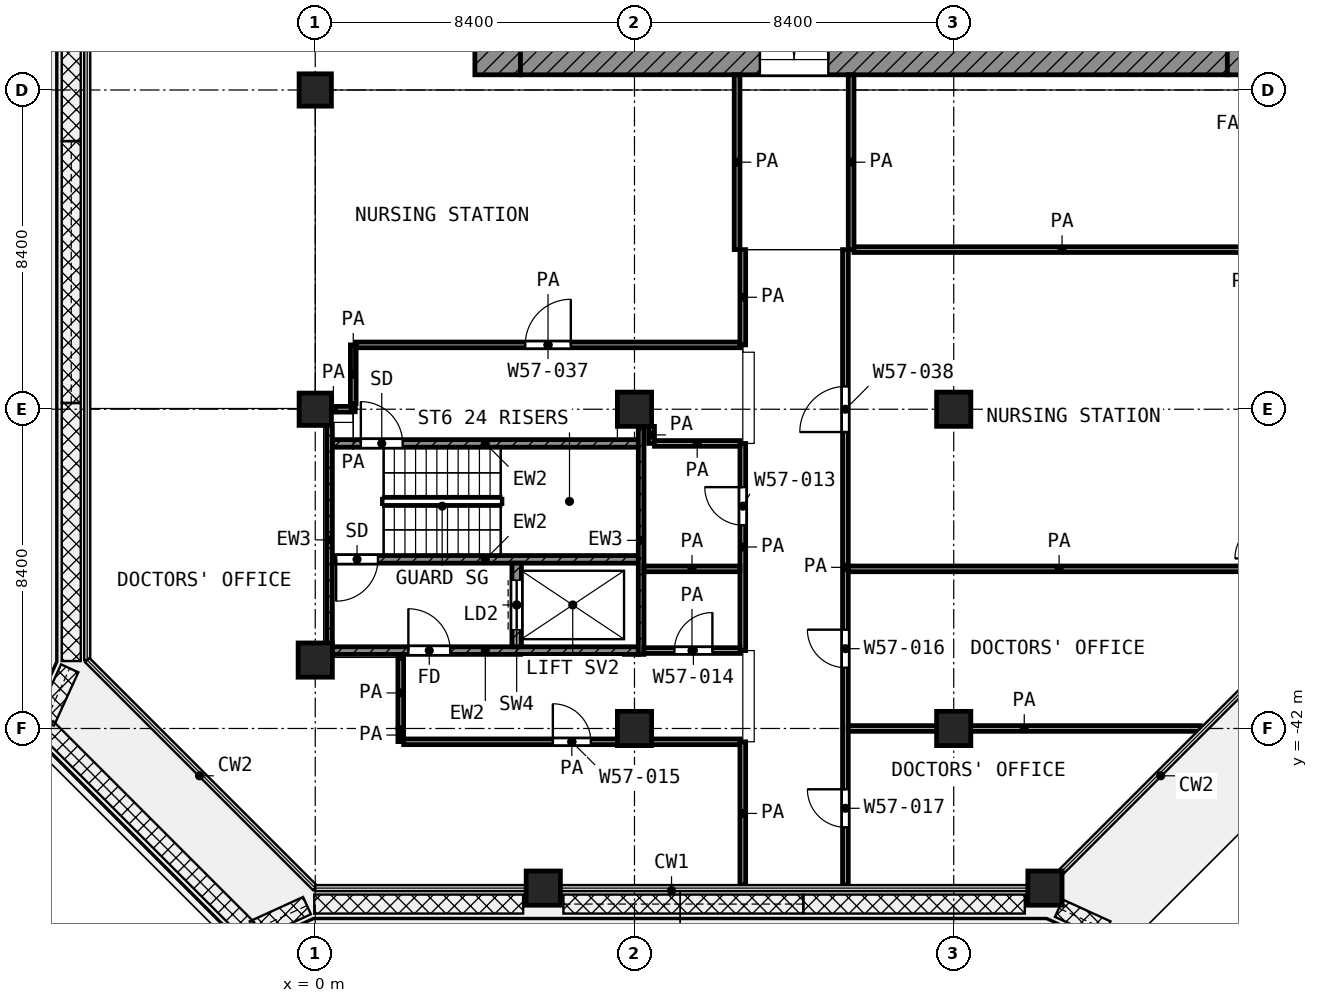
"""IFC4 building model, lengths in metres.
Left out: names, types, materials, properties, quantities, classifications, styles, units other than length and angle.
Written with IfcOpenShell. Run it as: python <this file> out.ifc"""

import sys

from ifc_helpers import new_model, si_unit, direction, frame, frame_2d, origin, origin_2d, place, context, subcontext, project, spatial, rectangle, extrude, element, fill, save


model = new_model("IFC4")
c1 = context("Model", 3, precision=1e-05, world=origin(), true_north=direction((0.0, 1.0)))
c2 = subcontext(c1, "Body", "Model", "MODEL_VIEW")
j1 = project(units=[si_unit("LENGTHUNIT", "METRE"), si_unit("PLANEANGLEUNIT", "RADIAN")], contexts=[c1])
p1 = place(None, origin())
s1 = spatial("IfcSite", under=j1, at=p1, CompositionType="ELEMENT")
p2 = place(p1, origin())
s2 = spatial("IfcBuilding", under=s1, at=p2, CompositionType="ELEMENT")
p3 = place(p2, frame((0.0, 0.0, 268.4)))
s3 = spatial("IfcBuildingStorey", under=s2, at=p3, CompositionType="ELEMENT", Elevation=268.4)
for number, where, z_axis, x_axis in (
    (1, (0.0, -25.2, 0.0), (0.0, 0.0, 1.0), (1.0, 0.0, 0.0)),
    (2, (0.0, -33.6, 0.0), (0.0, 0.0, 1.0), (1.0, 0.0, 0.0)),
):
    element("IfcColumn", number, at=place(p3, frame(where, z_axis=z_axis, x_axis=x_axis)), inside=s3, PredefinedType="COLUMN", context=c2, shape_type="SweptSolid", body=[
        extrude(rectangle(XDim=0.85, YDim=0.85, at=origin_2d()), origin(), (0.0, 0.0, 1.0), 4.2),
    ])
for number, where, z_axis, x_axis in (
    (3, (8.4, -33.6, 0.0), (0.0, 0.0, 1.0), (1.0, 0.0, 0.0)),
    (4, (16.8, -33.6, 0.0), (0.0, 0.0, 1.0), (1.0, 0.0, 0.0)),
    (5, (0.0, -40.2, 0.0), (0.0, 0.0, 1.0), (1.0, 0.0, 0.0)),
    (6, (8.4, -42.0, 0.0), (0.0, 0.0, 1.0), (1.0, 0.0, 0.0)),
    (7, (16.8, -42.0, 0.0), (0.0, 0.0, 1.0), (1.0, 0.0, 0.0)),
    (8, (6.0, -46.2, 0.0), (0.0, 0.0, 1.0), (1.0, 0.0, 0.0)),
    (9, (19.2, -46.2, 0.0), (0.0, 0.0, 1.0), (1.0, 0.0, 0.0)),
):
    element("IfcColumn", number, at=place(p3, frame(where, z_axis=z_axis, x_axis=x_axis)), inside=s3, PredefinedType="COLUMN", context=c2, shape_type="SweptSolid", body=[
        extrude(rectangle(XDim=0.9, YDim=0.9, at=origin_2d()), origin(), (0.0, 0.0, 1.0), 4.2),
    ])
p4 = place(p3, frame((4.8, -24.8, 0.0), z_axis=(0.0, 0.0, 1.0), x_axis=(0.0, 1.0, 0.0)))
e10 = element("IfcWall", 10, at=p4, inside=s3, PredefinedType="SHEAR", context=c2, shape_type="SweptSolid", body=[
    extrude(rectangle(XDim=19.4, YDim=1.2, at=frame_2d((9.7, 0.0))), origin(), (0.0, 0.0, 1.0), 3.7),
])
p5 = place(p4, frame((11.25, 0.0, 0.0)))
e11 = element("IfcOpeningElement", 11, at=p5, cuts=e10, PredefinedType="OPENING", context=c2, shape_type="SweptSolid", body=[
    extrude(rectangle(XDim=1.1, YDim=2.1, at=frame_2d((0.55, 1.05))), frame((0.0, 0.61, 0.0), z_axis=(0.0, -1.0, 0.0), x_axis=(1.0, 0.0, 0.0)), (0.0, 0.0, 1.0), 1.22),
])
p6 = place(p4, frame((1.95, 0.0, 0.0)))
e12 = element("IfcOpeningElement", 12, at=p6, cuts=e10, PredefinedType="OPENING", context=c2, shape_type="SweptSolid", body=[
    extrude(rectangle(XDim=1.1, YDim=2.1, at=frame_2d((0.55, 1.05))), frame((0.0, 0.61, 0.0), z_axis=(0.0, -1.0, 0.0), x_axis=(1.0, 0.0, 0.0)), (0.0, 0.0, 1.0), 1.22),
])
p7 = place(p3, frame((5.4, -24.4, 0.0), z_axis=(0.0, 0.0, 1.0), x_axis=(1.0, 0.0, 0.0)))
e13 = element("IfcWall", 13, at=p7, inside=s3, PredefinedType="SHEAR", context=c2, shape_type="SweptSolid", body=[
    extrude(rectangle(XDim=18.6, YDim=0.8, at=frame_2d((9.3, 0.0))), origin(), (0.0, 0.0, 1.0), 3.7),
])
p8 = place(p7, frame((6.3, 0.0, 0.0)))
e14 = element("IfcOpeningElement", 14, at=p8, cuts=e13, PredefinedType="OPENING", context=c2, shape_type="SweptSolid", body=[
    extrude(rectangle(XDim=1.8, YDim=2.1, at=frame_2d((0.9, 1.05))), frame((0.0, 0.41, 0.0), z_axis=(0.0, -1.0, 0.0), x_axis=(1.0, 0.0, 0.0)), (0.0, 0.0, 1.0), 0.82),
])
p9 = place(p3, frame((24.4, -24.8, 0.0), z_axis=(0.0, 0.0, 1.0), x_axis=(0.0, 1.0, 0.0)))
e15 = element("IfcWall", 15, at=p9, inside=s3, PredefinedType="SHEAR", context=c2, shape_type="SweptSolid", body=[
    extrude(rectangle(XDim=0.8, YDim=0.8, at=frame_2d((0.4, 0.0))), origin(), (0.0, 0.0, 1.0), 3.7),
])
p10 = place(p3, frame((0.375, -40.05, 0.0), z_axis=(0.0, 0.0, 1.0), x_axis=(0.0, 1.0, 0.0)))
e16 = element("IfcWall", 16, at=p10, inside=s3, PredefinedType="SHEAR", context=c2, shape_type="SweptSolid", body=[
    extrude(rectangle(XDim=6.025, YDim=0.15, at=frame_2d((3.013, 0.0))), origin(), (0.0, 0.0, 1.0), 3.7),
])
p11 = place(p3, frame((8.575, -40.05, 0.0), z_axis=(0.0, 0.0, 1.0), x_axis=(0.0, 1.0, 0.0)))
e17 = element("IfcWall", 17, at=p11, inside=s3, PredefinedType="SHEAR", context=c2, shape_type="SweptSolid", body=[
    extrude(rectangle(XDim=6.0, YDim=0.15, at=frame_2d((3.0, 0.0))), origin(), (0.0, 0.0, 1.0), 3.7),
])
p12 = place(p3, frame((0.45, -34.5, 0.0), z_axis=(0.0, 0.0, 1.0), x_axis=(1.0, 0.0, 0.0)))
e18 = element("IfcWall", 18, at=p12, inside=s3, PredefinedType="SHEAR", context=c2, shape_type="SweptSolid", body=[
    extrude(rectangle(XDim=8.05, YDim=0.2, at=frame_2d((4.025, 0.0))), origin(), (0.0, 0.0, 1.0), 3.7),
])
p13 = place(p12, frame((0.75, 0.0, 0.0)))
e19 = element("IfcOpeningElement", 19, at=p13, cuts=e18, PredefinedType="OPENING", context=c2, shape_type="SweptSolid", body=[
    extrude(rectangle(XDim=1.1, YDim=2.1, at=frame_2d((0.55, 1.05))), frame((0.0, 0.11, 0.0), z_axis=(0.0, -1.0, 0.0), x_axis=(1.0, 0.0, 0.0)), (0.0, 0.0, 1.0), 0.22),
])
p14 = place(p3, frame((0.45, -37.55, 0.0), z_axis=(0.0, 0.0, 1.0), x_axis=(1.0, 0.0, 0.0)))
e20 = element("IfcWall", 20, at=p14, inside=s3, PredefinedType="SHEAR", context=c2, shape_type="SweptSolid", body=[
    extrude(rectangle(XDim=8.05, YDim=0.2, at=frame_2d((4.025, 0.0))), origin(), (0.0, 0.0, 1.0), 3.7),
])
p15 = place(p14, frame((0.1, 0.0, 0.0)))
e21 = element("IfcOpeningElement", 21, at=p15, cuts=e20, PredefinedType="OPENING", context=c2, shape_type="SweptSolid", body=[
    extrude(rectangle(XDim=1.1, YDim=2.1, at=frame_2d((0.55, 1.05))), frame((0.0, 0.11, 0.0), z_axis=(0.0, -1.0, 0.0), x_axis=(1.0, 0.0, 0.0)), (0.0, 0.0, 1.0), 0.22),
])
p16 = place(p3, frame((0.45, -39.95, 0.0), z_axis=(0.0, 0.0, 1.0), x_axis=(1.0, 0.0, 0.0)))
e22 = element("IfcWall", 22, at=p16, inside=s3, PredefinedType="SHEAR", context=c2, shape_type="SweptSolid", body=[
    extrude(rectangle(XDim=8.05, YDim=0.2, at=frame_2d((4.025, 0.0))), origin(), (0.0, 0.0, 1.0), 3.7),
])
p17 = place(p16, frame((2.0, 0.0, 0.0)))
e23 = element("IfcOpeningElement", 23, at=p17, cuts=e22, PredefinedType="OPENING", context=c2, shape_type="SweptSolid", body=[
    extrude(rectangle(XDim=1.1, YDim=2.1, at=frame_2d((0.55, 1.05))), frame((0.0, 0.11, 0.0), z_axis=(0.0, -1.0, 0.0), x_axis=(1.0, 0.0, 0.0)), (0.0, 0.0, 1.0), 0.22),
])
p18 = place(p3, frame((5.3, -39.85, 0.0), z_axis=(0.0, 0.0, 1.0), x_axis=(0.0, 1.0, 0.0)))
e24 = element("IfcWall", 24, at=p18, inside=s3, PredefinedType="SHEAR", context=c2, shape_type="SweptSolid", body=[
    extrude(rectangle(XDim=2.2, YDim=0.25, at=frame_2d((1.1, 0.0))), origin(), (0.0, 0.0, 1.0), 3.7),
])
p19 = place(p18, frame((0.45, 0.0, 0.0)))
e25 = element("IfcOpeningElement", 25, at=p19, cuts=e24, PredefinedType="OPENING", context=c2, shape_type="SweptSolid", body=[
    extrude(rectangle(XDim=1.3, YDim=2.1, at=frame_2d((0.65, 1.05))), frame((0.0, 0.135, 0.0), z_axis=(0.0, -1.0, 0.0), x_axis=(1.0, 0.0, 0.0)), (0.0, 0.0, 1.0), 0.27),
])
p20 = place(p3, frame((2.328, -42.35, 0.0), z_axis=(0.0, 0.0, 1.0), x_axis=(1.0, 0.0, 0.0)))
e26 = element("IfcWall", 26, at=p20, inside=s3, PredefinedType="PARTITIONING", context=c2, shape_type="SweptSolid", body=[
    extrude(rectangle(XDim=8.847, YDim=0.15, at=frame_2d((4.424, 0.0))), origin(), (0.0, 0.0, 1.0), 3.7),
])
p21 = place(p20, frame((3.924, 0.0, 0.0)))
e27 = element("IfcOpeningElement", 27, at=p21, cuts=e26, PredefinedType="OPENING", context=c2, shape_type="SweptSolid", body=[
    extrude(rectangle(XDim=1.0, YDim=2.1, at=frame_2d((0.5, 1.05))), frame((0.0, 0.085, 0.0), z_axis=(0.0, -1.0, 0.0), x_axis=(1.0, 0.0, 0.0)), (0.0, 0.0, 1.0), 0.17),
])
p22 = place(p3, frame((14.025, -42.0, 0.0), z_axis=(0.0, 0.0, 1.0), x_axis=(1.0, 0.0, 0.0)))
e28 = element("IfcWall", 28, at=p22, inside=s3, PredefinedType="PARTITIONING", context=c2, shape_type="SweptSolid", body=[
    extrude(rectangle(XDim=9.262, YDim=0.15, at=frame_2d((4.631, 0.0))), origin(), (0.0, 0.0, 1.0), 3.7),
])
p23 = place(p3, frame((8.65, -39.95, 0.0), z_axis=(0.0, 0.0, 1.0), x_axis=(1.0, 0.0, 0.0)))
e29 = element("IfcWall", 29, at=p23, inside=s3, PredefinedType="PARTITIONING", context=c2, shape_type="SweptSolid", body=[
    extrude(rectangle(XDim=2.525, YDim=0.15, at=frame_2d((1.263, 0.0))), origin(), (0.0, 0.0, 1.0), 3.7),
])
p24 = place(p23, frame((0.8, 0.0, 0.0)))
e30 = element("IfcOpeningElement", 30, at=p24, cuts=e29, PredefinedType="OPENING", context=c2, shape_type="SweptSolid", body=[
    extrude(rectangle(XDim=1.0, YDim=2.1, at=frame_2d((0.5, 1.05))), frame((0.0, 0.085, 0.0), z_axis=(0.0, -1.0, 0.0), x_axis=(1.0, 0.0, 0.0)), (0.0, 0.0, 1.0), 0.17),
])
p25 = place(p3, frame((8.65, -37.8, 0.0), z_axis=(0.0, 0.0, 1.0), x_axis=(1.0, 0.0, 0.0)))
e31 = element("IfcWall", 31, at=p25, inside=s3, PredefinedType="PARTITIONING", context=c2, shape_type="SweptSolid", body=[
    extrude(rectangle(XDim=2.525, YDim=0.15, at=frame_2d((1.263, 0.0))), origin(), (0.0, 0.0, 1.0), 3.7),
])
p26 = place(p3, frame((14.025, -37.8, 0.0), z_axis=(0.0, 0.0, 1.0), x_axis=(1.0, 0.0, 0.0)))
e32 = element("IfcWall", 32, at=p26, inside=s3, PredefinedType="PARTITIONING", context=c2, shape_type="SweptSolid", body=[
    extrude(rectangle(XDim=11.095, YDim=0.15, at=frame_2d((5.548, 0.0))), origin(), (0.0, 0.0, 1.0), 3.7),
])
p27 = place(p3, frame((8.925, -34.5, 0.0), z_axis=(0.0, 0.0, 1.0), x_axis=(1.0, 0.0, 0.0)))
e33 = element("IfcWall", 33, at=p27, inside=s3, PredefinedType="PARTITIONING", context=c2, shape_type="SweptSolid", body=[
    extrude(rectangle(XDim=2.25, YDim=0.15, at=frame_2d((1.125, 0.0))), origin(), (0.0, 0.0, 1.0), 3.7),
])
p28 = place(p3, frame((0.006, -33.6, 0.0), z_axis=(0.0, 0.0, 1.0), x_axis=(1.0, 0.0, 0.0)))
e34 = element("IfcWall", 34, at=p28, inside=s3, PredefinedType="PARTITIONING", context=c2, shape_type="SweptSolid", body=[
    extrude(rectangle(XDim=0.944, YDim=0.15, at=frame_2d((0.472, 0.0))), origin(), (0.0, 0.0, 1.0), 3.7),
])
p29 = place(p3, frame((0.95, -33.59, 0.0), z_axis=(0.0, 0.0, 1.0), x_axis=(1.0, 0.0, 0.0)))
e35 = element("IfcWall", 35, at=p29, inside=s3, PredefinedType="PARTITIONING", context=c2, shape_type="SweptSolid", body=[
    extrude(rectangle(XDim=0.099, YDim=0.15, at=frame_2d((0.05, 0.0))), origin(), (0.0, 0.0, 1.0), 3.7),
])
p30 = place(p3, frame((1.075, -31.907, 0.0), z_axis=(0.0, 0.0, 1.0), x_axis=(1.0, 0.0, 0.0)))
e36 = element("IfcWall", 36, at=p30, inside=s3, PredefinedType="PARTITIONING", context=c2, shape_type="SweptSolid", body=[
    extrude(rectangle(XDim=10.1, YDim=0.15, at=frame_2d((5.05, 0.0))), origin(), (0.0, 0.0, 1.0), 3.7),
])
p31 = place(p30, frame((4.45, 0.0, 0.0)))
e37 = element("IfcOpeningElement", 37, at=p31, cuts=e36, PredefinedType="OPENING", context=c2, shape_type="SweptSolid", body=[
    extrude(rectangle(XDim=1.2, YDim=2.1, at=frame_2d((0.6, 1.05))), frame((0.0, 0.085, 0.0), z_axis=(0.0, -1.0, 0.0), x_axis=(1.0, 0.0, 0.0)), (0.0, 0.0, 1.0), 0.17),
])
p32 = place(p3, frame((14.175, -29.4, 0.0), z_axis=(0.0, 0.0, 1.0), x_axis=(1.0, 0.0, 0.0)))
e38 = element("IfcWall", 38, at=p32, inside=s3, PredefinedType="PARTITIONING", context=c2, shape_type="SweptSolid", body=[
    extrude(rectangle(XDim=10.95, YDim=0.15, at=frame_2d((5.475, 0.0))), origin(), (0.0, 0.0, 1.0), 3.7),
])
p33 = place(p3, frame((1.0, -33.455, 0.0), z_axis=(0.0, 0.0, 1.0), x_axis=(0.0, 1.0, 0.0)))
e39 = element("IfcWall", 39, at=p33, inside=s3, PredefinedType="PARTITIONING", context=c2, shape_type="SweptSolid", body=[
    extrude(rectangle(XDim=1.548, YDim=0.15, at=frame_2d((0.774, 0.0))), origin(), (0.0, 0.0, 1.0), 3.7),
])
p34 = place(p3, frame((2.25, -42.346, 0.0), z_axis=(0.0, 0.0, 1.0), x_axis=(0.0, 1.0, 0.0)))
e40 = element("IfcWall", 40, at=p34, inside=s3, PredefinedType="PARTITIONING", context=c2, shape_type="SweptSolid", body=[
    extrude(rectangle(XDim=0.346, YDim=0.15, at=frame_2d((0.173, 0.0))), origin(), (0.0, 0.0, 1.0), 3.7),
])
p35 = place(p3, frame((2.25, -41.98, 0.0), z_axis=(0.0, 0.0, 1.0), x_axis=(0.0, 1.0, 0.0)))
e41 = element("IfcWall", 41, at=p35, inside=s3, PredefinedType="PARTITIONING", context=c2, shape_type="SweptSolid", body=[
    extrude(rectangle(XDim=1.83, YDim=0.15, at=frame_2d((0.915, 0.0))), origin(), (0.0, 0.0, 1.0), 3.7),
])
p36 = place(p3, frame((8.85, -34.5, 0.0), z_axis=(0.0, 0.0, 1.0), x_axis=(0.0, 1.0, 0.0)))
e42 = element("IfcWall", 42, at=p36, inside=s3, PredefinedType="PARTITIONING", context=c2, shape_type="SweptSolid", body=[
    extrude(rectangle(XDim=0.449, YDim=0.15, at=frame_2d((0.225, 0.0))), origin(), (0.0, 0.0, 1.0), 3.7),
])
p37 = place(p3, frame((11.1, -29.4, 0.0), z_axis=(0.0, 0.0, 1.0), x_axis=(0.0, 1.0, 0.0)))
e43 = element("IfcWall", 43, at=p37, inside=s3, PredefinedType="PARTITIONING", context=c2, shape_type="SweptSolid", body=[
    extrude(rectangle(XDim=4.6, YDim=0.15, at=frame_2d((2.3, 0.0))), origin(), (0.0, 0.0, 1.0), 3.7),
])
p38 = place(p3, frame((11.25, -46.12, 0.0), z_axis=(0.0, 0.0, 1.0), x_axis=(0.0, 1.0, 0.0)))
e44 = element("IfcWall", 44, at=p38, inside=s3, PredefinedType="PARTITIONING", context=c2, shape_type="SweptSolid", body=[
    extrude(rectangle(XDim=3.77, YDim=0.15, at=frame_2d((1.885, 0.0))), origin(), (0.0, 0.0, 1.0), 3.7),
])
p39 = place(p3, frame((11.25, -39.95, 0.0), z_axis=(0.0, 0.0, 1.0), x_axis=(0.0, 1.0, 0.0)))
e45 = element("IfcWall", 45, at=p39, inside=s3, PredefinedType="PARTITIONING", context=c2, shape_type="SweptSolid", body=[
    extrude(rectangle(XDim=5.45, YDim=0.15, at=frame_2d((2.725, 0.0))), origin(), (0.0, 0.0, 1.0), 3.7),
])
p40 = place(p39, frame((3.3, 0.0, 0.0)))
e46 = element("IfcOpeningElement", 46, at=p40, cuts=e45, PredefinedType="OPENING", context=c2, shape_type="SweptSolid", body=[
    extrude(rectangle(XDim=1.0, YDim=2.1, at=frame_2d((0.5, 1.05))), frame((0.0, 0.085, 0.0), z_axis=(0.0, -1.0, 0.0), x_axis=(1.0, 0.0, 0.0)), (0.0, 0.0, 1.0), 0.17),
])
p41 = place(p3, frame((11.25, -31.907, 0.0), z_axis=(0.0, 0.0, 1.0), x_axis=(0.0, 1.0, 0.0)))
e47 = element("IfcWall", 47, at=p41, inside=s3, PredefinedType="PARTITIONING", context=c2, shape_type="SweptSolid", body=[
    extrude(rectangle(XDim=2.507, YDim=0.15, at=frame_2d((1.253, 0.0))), origin(), (0.0, 0.0, 1.0), 3.7),
])
p42 = place(p3, frame((13.95, -46.12, 0.0), z_axis=(0.0, 0.0, 1.0), x_axis=(0.0, 1.0, 0.0)))
e48 = element("IfcWall", 48, at=p42, inside=s3, PredefinedType="PARTITIONING", context=c2, shape_type="SweptSolid", body=[
    extrude(rectangle(XDim=16.72, YDim=0.15, at=frame_2d((8.36, 0.0))), origin(), (0.0, 0.0, 1.0), 3.7),
])
p43 = place(p42, frame((11.92, 0.0, 0.0)))
e49 = element("IfcOpeningElement", 49, at=p43, cuts=e48, PredefinedType="OPENING", context=c2, shape_type="SweptSolid", body=[
    extrude(rectangle(XDim=1.2, YDim=2.1, at=frame_2d((0.6, 1.05))), frame((0.0, 0.085, 0.0), z_axis=(0.0, -1.0, 0.0), x_axis=(1.0, 0.0, 0.0)), (0.0, 0.0, 1.0), 0.17),
])
p44 = place(p42, frame((5.72, 0.0, 0.0)))
e50 = element("IfcOpeningElement", 50, at=p44, cuts=e48, PredefinedType="OPENING", context=c2, shape_type="SweptSolid", body=[
    extrude(rectangle(XDim=1.0, YDim=2.1, at=frame_2d((0.5, 1.05))), frame((0.0, 0.085, 0.0), z_axis=(0.0, -1.0, 0.0), x_axis=(1.0, 0.0, 0.0)), (0.0, 0.0, 1.0), 0.17),
])
p45 = place(p42, frame((1.52, 0.0, 0.0)))
e51 = element("IfcOpeningElement", 51, at=p45, cuts=e48, PredefinedType="OPENING", context=c2, shape_type="SweptSolid", body=[
    extrude(rectangle(XDim=1.0, YDim=2.1, at=frame_2d((0.5, 1.05))), frame((0.0, 0.085, 0.0), z_axis=(0.0, -1.0, 0.0), x_axis=(1.0, 0.0, 0.0)), (0.0, 0.0, 1.0), 0.17),
])
p46 = place(p3, frame((14.1, -29.4, 0.0), z_axis=(0.0, 0.0, 1.0), x_axis=(0.0, 1.0, 0.0)))
e52 = element("IfcWall", 52, at=p46, inside=s3, PredefinedType="PARTITIONING", context=c2, shape_type="SweptSolid", body=[
    extrude(rectangle(XDim=4.6, YDim=0.15, at=frame_2d((2.3, 0.0))), origin(), (0.0, 0.0, 1.0), 3.7),
])
p47 = place(p8, origin())
e53 = element("IfcDoor", 53, at=p47, inside=s3, OperationType="DOUBLE_DOOR_SINGLE_SWING", PredefinedType="DOOR", context=c2, shape_type="SweptSolid", body=[
    extrude(rectangle(XDim=1.8, YDim=2.1, at=frame_2d((0.9, 1.05))), frame((0.0, 0.025, 0.0), z_axis=(0.0, -1.0, 0.0), x_axis=(1.0, 0.0, 0.0)), (0.0, 0.0, 1.0), 0.05),
])
fill(e14, e53)
p48 = place(p13, origin())
e54 = element("IfcDoor", 54, at=p48, inside=s3, OperationType="SINGLE_SWING_LEFT", PredefinedType="DOOR", context=c2, shape_type="SweptSolid", body=[
    extrude(rectangle(XDim=1.1, YDim=2.1, at=frame_2d((0.55, 1.05))), frame((0.0, 0.025, 0.0), z_axis=(0.0, -1.0, 0.0), x_axis=(1.0, 0.0, 0.0)), (0.0, 0.0, 1.0), 0.05),
])
fill(e19, e54)
p49 = place(p15, frame((1.1, 0.0, 0.0), z_axis=(0.0, 0.0, 1.0), x_axis=(-1.0, 0.0, 0.0)))
e55 = element("IfcDoor", 55, at=p49, inside=s3, OperationType="SINGLE_SWING_LEFT", PredefinedType="DOOR", context=c2, shape_type="SweptSolid", body=[
    extrude(rectangle(XDim=1.1, YDim=2.1, at=frame_2d((0.55, 1.05))), frame((0.0, 0.025, 0.0), z_axis=(0.0, -1.0, 0.0), x_axis=(1.0, 0.0, 0.0)), (0.0, 0.0, 1.0), 0.05),
])
fill(e21, e55)
p50 = place(p19, origin())
e56 = element("IfcDoor", 56, at=p50, inside=s3, OperationType="DOUBLE_DOOR_SLIDING", PredefinedType="DOOR", context=c2, shape_type="SweptSolid", body=[
    extrude(rectangle(XDim=1.3, YDim=2.1, at=frame_2d((0.65, 1.05))), frame((0.0, 0.025, 0.0), z_axis=(0.0, -1.0, 0.0), x_axis=(1.0, 0.0, 0.0)), (0.0, 0.0, 1.0), 0.05),
])
fill(e25, e56)
p51 = place(p17, origin())
e57 = element("IfcDoor", 57, at=p51, inside=s3, OperationType="SINGLE_SWING_LEFT", PredefinedType="DOOR", context=c2, shape_type="SweptSolid", body=[
    extrude(rectangle(XDim=1.1, YDim=2.1, at=frame_2d((0.55, 1.05))), frame((0.0, 0.025, 0.0), z_axis=(0.0, -1.0, 0.0), x_axis=(1.0, 0.0, 0.0)), (0.0, 0.0, 1.0), 0.05),
])
fill(e23, e57)
p52 = place(p31, origin())
e58 = element("IfcDoor", 58, at=p52, inside=s3, OperationType="SINGLE_SWING_RIGHT", PredefinedType="DOOR", context=c2, shape_type="SweptSolid", body=[
    extrude(rectangle(XDim=1.2, YDim=2.1, at=frame_2d((0.6, 1.05))), frame((0.0, 0.025, 0.0), z_axis=(0.0, -1.0, 0.0), x_axis=(1.0, 0.0, 0.0)), (0.0, 0.0, 1.0), 0.05),
])
fill(e37, e58)
p53 = place(p40, origin())
e59 = element("IfcDoor", 59, at=p53, inside=s3, OperationType="SINGLE_SWING_RIGHT", PredefinedType="DOOR", context=c2, shape_type="SweptSolid", body=[
    extrude(rectangle(XDim=1.0, YDim=2.1, at=frame_2d((0.5, 1.05))), frame((0.0, 0.025, 0.0), z_axis=(0.0, -1.0, 0.0), x_axis=(1.0, 0.0, 0.0)), (0.0, 0.0, 1.0), 0.05),
])
fill(e46, e59)
p54 = place(p24, origin())
e60 = element("IfcDoor", 60, at=p54, inside=s3, OperationType="SINGLE_SWING_RIGHT", PredefinedType="DOOR", context=c2, shape_type="SweptSolid", body=[
    extrude(rectangle(XDim=1.0, YDim=2.1, at=frame_2d((0.5, 1.05))), frame((0.0, 0.025, 0.0), z_axis=(0.0, -1.0, 0.0), x_axis=(1.0, 0.0, 0.0)), (0.0, 0.0, 1.0), 0.05),
])
fill(e30, e60)
p55 = place(p21, origin())
e61 = element("IfcDoor", 61, at=p55, inside=s3, OperationType="SINGLE_SWING_LEFT", PredefinedType="DOOR", context=c2, shape_type="SweptSolid", body=[
    extrude(rectangle(XDim=1.0, YDim=2.1, at=frame_2d((0.5, 1.05))), frame((0.0, 0.025, 0.0), z_axis=(0.0, -1.0, 0.0), x_axis=(1.0, 0.0, 0.0)), (0.0, 0.0, 1.0), 0.05),
])
fill(e27, e61)
p56 = place(p43, origin())
e62 = element("IfcDoor", 62, at=p56, inside=s3, OperationType="SINGLE_SWING_LEFT", PredefinedType="DOOR", context=c2, shape_type="SweptSolid", body=[
    extrude(rectangle(XDim=1.2, YDim=2.1, at=frame_2d((0.6, 1.05))), frame((0.0, 0.025, 0.0), z_axis=(0.0, -1.0, 0.0), x_axis=(1.0, 0.0, 0.0)), (0.0, 0.0, 1.0), 0.05),
])
fill(e49, e62)
p57 = place(p44, origin())
e63 = element("IfcDoor", 63, at=p57, inside=s3, OperationType="SINGLE_SWING_RIGHT", PredefinedType="DOOR", context=c2, shape_type="SweptSolid", body=[
    extrude(rectangle(XDim=1.0, YDim=2.1, at=frame_2d((0.5, 1.05))), frame((0.0, 0.025, 0.0), z_axis=(0.0, -1.0, 0.0), x_axis=(1.0, 0.0, 0.0)), (0.0, 0.0, 1.0), 0.05),
])
fill(e50, e63)
p58 = place(p45, origin())
e64 = element("IfcDoor", 64, at=p58, inside=s3, OperationType="SINGLE_SWING_RIGHT", PredefinedType="DOOR", context=c2, shape_type="SweptSolid", body=[
    extrude(rectangle(XDim=1.0, YDim=2.1, at=frame_2d((0.5, 1.05))), frame((0.0, 0.025, 0.0), z_axis=(0.0, -1.0, 0.0), x_axis=(1.0, 0.0, 0.0)), (0.0, 0.0, 1.0), 0.05),
])
fill(e51, e64)
save(model, sys.argv[1])
